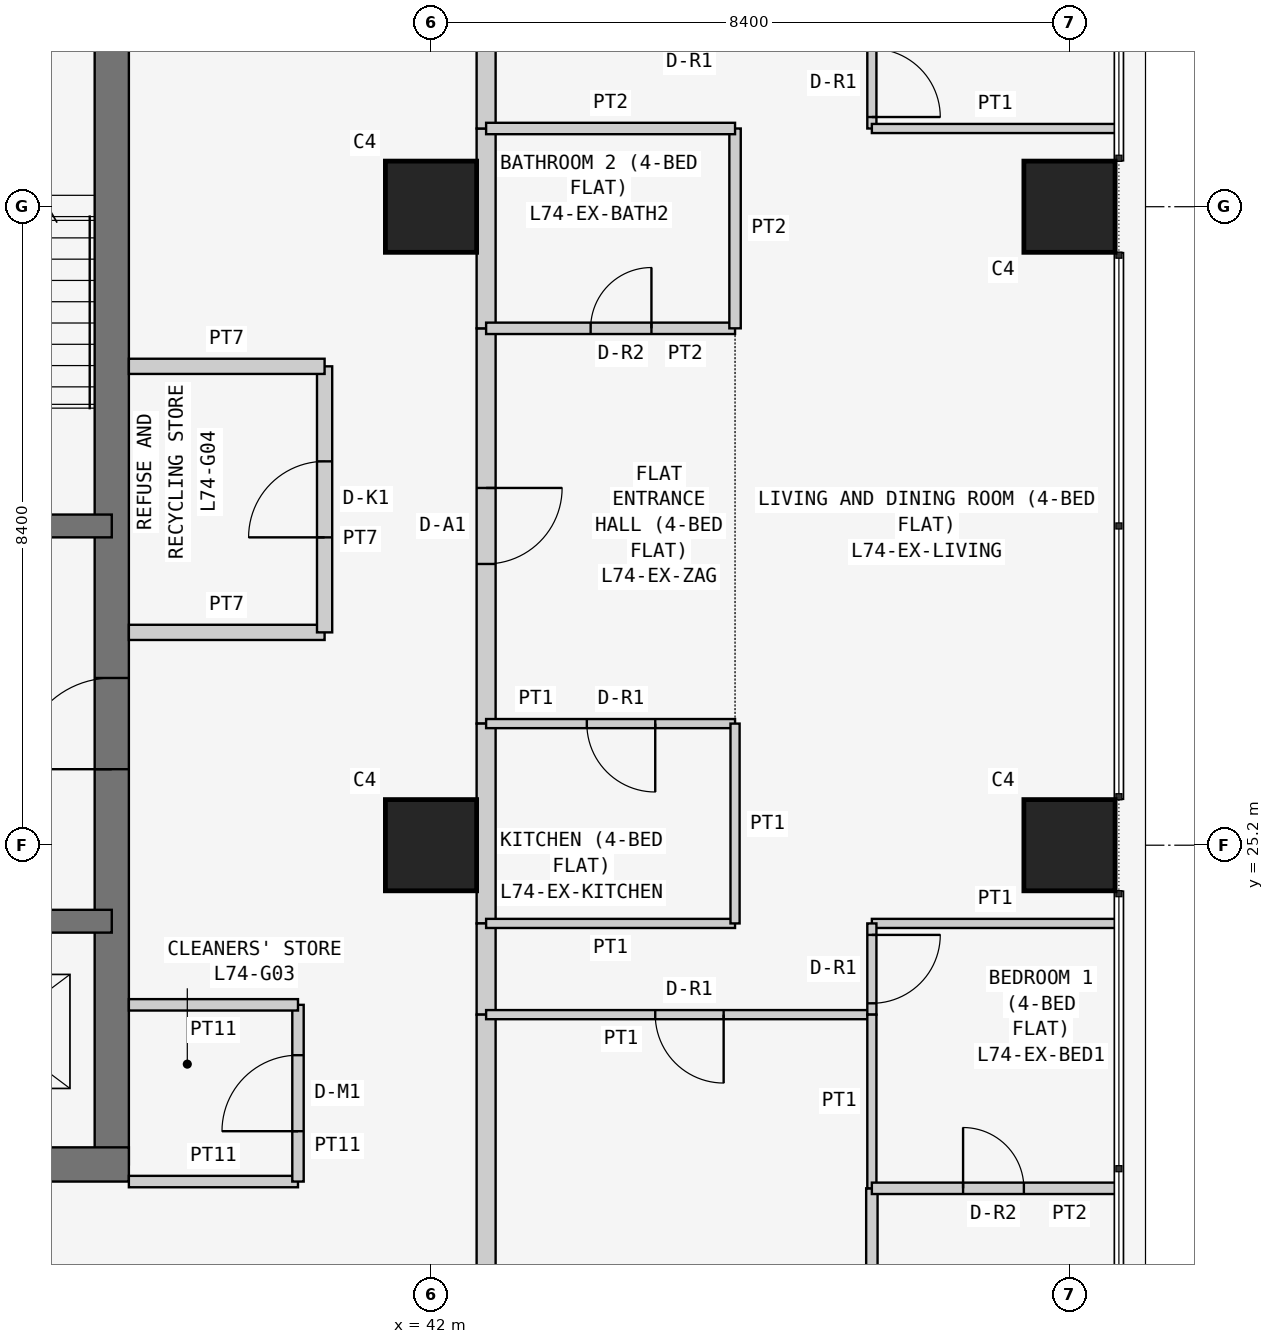
"""IFC4 building model, lengths in metres.
Left out: names, types, materials, properties, quantities, classifications, styles, units other than length and angle.
Written with IfcOpenShell. Run it as: python <this file> out.ifc"""

import sys

from ifc_helpers import new_model, si_unit, direction, frame, frame_2d, origin, origin_2d, place, context, subcontext, project, spatial, rectangle, extrude, element, fill, save


model = new_model("IFC4")
c1 = context("Model", 3, precision=1e-05, world=origin(), true_north=direction((0.0, 1.0)))
c2 = subcontext(c1, "Body", "Model", "MODEL_VIEW")
j1 = project(units=[si_unit("LENGTHUNIT", "METRE"), si_unit("PLANEANGLEUNIT", "RADIAN")], contexts=[c1])
p1 = place(None, origin())
s1 = spatial("IfcSite", under=j1, at=p1, CompositionType="ELEMENT")
p2 = place(p1, origin())
s2 = spatial("IfcBuilding", under=s1, at=p2, CompositionType="ELEMENT")
p3 = place(p2, frame((0.0, 0.0, 282.9)))
s3 = spatial("IfcBuildingStorey", under=s2, at=p3, CompositionType="ELEMENT", Elevation=282.9)
for number, where, z_axis, x_axis in (
    (1, (42.0, 25.2, 0.0), (0.0, 0.0, 1.0), (1.0, 0.0, 0.0)),
    (2, (42.0, 33.6, 0.0), (0.0, 0.0, 1.0), (1.0, 0.0, 0.0)),
    (3, (50.4, 25.2, 0.0), (0.0, 0.0, 1.0), (1.0, 0.0, 0.0)),
    (4, (50.4, 33.6, 0.0), (0.0, 0.0, 1.0), (1.0, 0.0, 0.0)),
):
    element("IfcColumn", number, at=place(p3, frame(where, z_axis=z_axis, x_axis=x_axis)), inside=s3, PredefinedType="COLUMN", context=c2, shape_type="SweptSolid", body=[
        extrude(rectangle(XDim=1.2, YDim=1.2, at=origin_2d()), origin(), (0.0, 0.0, 1.0), 3.6),
    ])
p4 = place(p3, frame((21.0, 21.0, 0.0), z_axis=(0.0, 0.0, 1.0), x_axis=(1.0, 0.0, 0.0)))
e5 = element("IfcWall", 5, at=p4, inside=s3, PredefinedType="SHEAR", context=c2, shape_type="SweptSolid", body=[
    extrude(rectangle(XDim=17.025, YDim=0.45, at=frame_2d((8.512, 0.0))), origin(), (0.0, 0.0, 1.0), 3.6),
])
p5 = place(p3, frame((37.8, 21.0, 0.0), z_axis=(0.0, 0.0, 1.0), x_axis=(0.0, 1.0, 0.0)))
e6 = element("IfcWall", 6, at=p5, inside=s3, PredefinedType="SHEAR", context=c2, shape_type="SweptSolid", body=[
    extrude(rectangle(XDim=17.025, YDim=0.45, at=frame_2d((8.512, 0.0))), origin(), (0.0, 0.0, 1.0), 3.6),
])
p6 = place(p5, frame((5.2, 0.0, 0.0)))
e7 = element("IfcOpeningElement", 7, at=p6, cuts=e6, PredefinedType="OPENING", context=c2, shape_type="SweptSolid", body=[
    extrude(rectangle(XDim=1.2, YDim=2.1, at=frame_2d((0.6, 1.05))), frame((0.0, 0.235, 0.0), z_axis=(0.0, -1.0, 0.0), x_axis=(1.0, 0.0, 0.0)), (0.0, 0.0, 1.0), 0.47),
])
p7 = place(p3, frame((26.6, 24.2, 0.0), z_axis=(0.0, 0.0, 1.0), x_axis=(1.0, 0.0, 0.0)))
e8 = element("IfcWall", 8, at=p7, inside=s3, PredefinedType="SHEAR", context=c2, shape_type="SweptSolid", body=[
    extrude(rectangle(XDim=11.2, YDim=0.3, at=frame_2d((5.6, 0.0))), origin(), (0.0, 0.0, 1.0), 3.6),
])
p8 = place(p7, frame((0.913, 0.0, 0.0)))
e9 = element("IfcOpeningElement", 9, at=p8, cuts=e8, PredefinedType="OPENING", context=c2, shape_type="SweptSolid", body=[
    extrude(rectangle(XDim=1.0, YDim=2.1, at=frame_2d((0.5, 1.05))), frame((0.0, 0.16, 0.0), z_axis=(0.0, -1.0, 0.0), x_axis=(1.0, 0.0, 0.0)), (0.0, 0.0, 1.0), 0.32),
])
p9 = place(p7, frame((3.7, 0.0, 0.0)))
e10 = element("IfcOpeningElement", 10, at=p9, cuts=e8, PredefinedType="OPENING", context=c2, shape_type="SweptSolid", body=[
    extrude(rectangle(XDim=1.0, YDim=2.1, at=frame_2d((0.5, 1.05))), frame((0.0, 0.16, 0.0), z_axis=(0.0, -1.0, 0.0), x_axis=(1.0, 0.0, 0.0)), (0.0, 0.0, 1.0), 0.32),
])
p10 = place(p7, frame((6.5, 0.0, 0.0)))
e11 = element("IfcOpeningElement", 11, at=p10, cuts=e8, PredefinedType="OPENING", context=c2, shape_type="SweptSolid", body=[
    extrude(rectangle(XDim=1.0, YDim=2.1, at=frame_2d((0.5, 1.05))), frame((0.0, 0.16, 0.0), z_axis=(0.0, -1.0, 0.0), x_axis=(1.0, 0.0, 0.0)), (0.0, 0.0, 1.0), 0.32),
])
p11 = place(p7, frame((9.1, 0.0, 0.0)))
e12 = element("IfcOpeningElement", 12, at=p11, cuts=e8, PredefinedType="OPENING", context=c2, shape_type="SweptSolid", body=[
    extrude(rectangle(XDim=1.1, YDim=2.1, at=frame_2d((0.55, 1.05))), frame((0.0, 0.16, 0.0), z_axis=(0.0, -1.0, 0.0), x_axis=(1.0, 0.0, 0.0)), (0.0, 0.0, 1.0), 0.32),
])
p12 = place(p3, frame((32.2, 29.4, 0.0), z_axis=(0.0, 0.0, 1.0), x_axis=(1.0, 0.0, 0.0)))
e13 = element("IfcWall", 13, at=p12, inside=s3, PredefinedType="SHEAR", context=c2, shape_type="SweptSolid", body=[
    extrude(rectangle(XDim=5.6, YDim=0.3, at=frame_2d((2.8, 0.0))), origin(), (0.0, 0.0, 1.0), 3.6),
])
p13 = place(p12, frame((2.0, 0.0, 0.0)))
e14 = element("IfcOpeningElement", 14, at=p13, cuts=e13, PredefinedType="OPENING", context=c2, shape_type="SweptSolid", body=[
    extrude(rectangle(XDim=1.2, YDim=2.1, at=frame_2d((0.6, 1.05))), frame((0.0, 0.16, 0.0), z_axis=(0.0, -1.0, 0.0), x_axis=(1.0, 0.0, 0.0)), (0.0, 0.0, 1.0), 0.32),
])
p14 = place(p3, frame((38.025, 20.775, 0.0), z_axis=(0.0, 0.0, 1.0), x_axis=(1.0, 0.0, 0.0)))
e15 = element("IfcWall", 15, at=p14, inside=s3, PredefinedType="PARTITIONING", context=c2, shape_type="SweptSolid", body=[
    extrude(rectangle(XDim=2.225, YDim=0.15, at=frame_2d((1.113, 0.0))), origin(), (0.0, 0.0, 1.0), 3.45),
])
p15 = place(p3, frame((40.25, 20.775, 0.0), z_axis=(0.0, 0.0, 1.0), x_axis=(0.0, 1.0, 0.0)))
e16 = element("IfcWall", 16, at=p15, inside=s3, PredefinedType="PARTITIONING", context=c2, shape_type="SweptSolid", body=[
    extrude(rectangle(XDim=2.325, YDim=0.15, at=frame_2d((1.163, 0.0))), origin(), (0.0, 0.0, 1.0), 3.45),
])
p16 = place(p15, frame((0.663, 0.0, 0.0)))
e17 = element("IfcOpeningElement", 17, at=p16, cuts=e16, PredefinedType="OPENING", context=c2, shape_type="SweptSolid", body=[
    extrude(rectangle(XDim=1.0, YDim=2.1, at=frame_2d((0.5, 1.05))), frame((0.0, 0.085, 0.0), z_axis=(0.0, -1.0, 0.0), x_axis=(1.0, 0.0, 0.0)), (0.0, 0.0, 1.0), 0.17),
])
p17 = place(p3, frame((40.25, 23.1, 0.0), z_axis=(0.0, 0.0, 1.0), x_axis=(-1.0, 0.0, 0.0)))
e18 = element("IfcWall", 18, at=p17, inside=s3, PredefinedType="PARTITIONING", context=c2, shape_type="SweptSolid", body=[
    extrude(rectangle(XDim=2.225, YDim=0.15, at=frame_2d((1.113, 0.0))), origin(), (0.0, 0.0, 1.0), 3.45),
])
p18 = place(p3, frame((38.025, 28.0, 0.0), z_axis=(0.0, 0.0, 1.0), x_axis=(1.0, 0.0, 0.0)))
e19 = element("IfcWall", 19, at=p18, inside=s3, PredefinedType="PARTITIONING", context=c2, shape_type="SweptSolid", body=[
    extrude(rectangle(XDim=2.575, YDim=0.2, at=frame_2d((1.288, 0.0))), origin(), (0.0, 0.0, 1.0), 3.45),
])
p19 = place(p3, frame((40.6, 28.0, 0.0), z_axis=(0.0, 0.0, 1.0), x_axis=(0.0, 1.0, 0.0)))
e20 = element("IfcWall", 20, at=p19, inside=s3, PredefinedType="PARTITIONING", context=c2, shape_type="SweptSolid", body=[
    extrude(rectangle(XDim=3.5, YDim=0.2, at=frame_2d((1.75, 0.0))), origin(), (0.0, 0.0, 1.0), 3.45),
])
p20 = place(p19, frame((1.25, 0.0, 0.0)))
e21 = element("IfcOpeningElement", 21, at=p20, cuts=e20, PredefinedType="OPENING", context=c2, shape_type="SweptSolid", body=[
    extrude(rectangle(XDim=1.0, YDim=2.1, at=frame_2d((0.5, 1.05))), frame((0.0, 0.11, 0.0), z_axis=(0.0, -1.0, 0.0), x_axis=(1.0, 0.0, 0.0)), (0.0, 0.0, 1.0), 0.22),
])
p21 = place(p3, frame((40.6, 31.5, 0.0), z_axis=(0.0, 0.0, 1.0), x_axis=(-1.0, 0.0, 0.0)))
e22 = element("IfcWall", 22, at=p21, inside=s3, PredefinedType="PARTITIONING", context=c2, shape_type="SweptSolid", body=[
    extrude(rectangle(XDim=2.575, YDim=0.2, at=frame_2d((1.288, 0.0))), origin(), (0.0, 0.0, 1.0), 3.45),
])
p22 = place(p3, frame((42.725, 32.0, 0.0), z_axis=(0.0, 0.0, 1.0), x_axis=(0.0, -1.0, 0.0)))
e23 = element("IfcWall", 23, at=p22, inside=s3, PredefinedType="PARTITIONING", context=c2, shape_type="SweptSolid", body=[
    extrude(rectangle(XDim=5.2, YDim=0.25, at=frame_2d((2.6, 0.0))), origin(), (0.0, 0.0, 1.0), 3.45),
])
p23 = place(p22, frame((2.1, 0.0, 0.0)))
e24 = element("IfcOpeningElement", 24, at=p23, cuts=e23, PredefinedType="OPENING", context=c2, shape_type="SweptSolid", body=[
    extrude(rectangle(XDim=1.0, YDim=2.1, at=frame_2d((0.5, 1.05))), frame((0.0, 0.135, 0.0), z_axis=(0.0, -1.0, 0.0), x_axis=(1.0, 0.0, 0.0)), (0.0, 0.0, 1.0), 0.27),
])
p24 = place(p3, frame((42.725, 34.629, 0.0), z_axis=(0.0, 0.0, 1.0), x_axis=(0.0, -1.0, 0.0)))
e25 = element("IfcWall", 25, at=p24, inside=s3, PredefinedType="PARTITIONING", context=c2, shape_type="SweptSolid", body=[
    extrude(rectangle(XDim=2.629, YDim=0.25, at=frame_2d((1.314, 0.0))), origin(), (0.0, 0.0, 1.0), 3.45),
])
p25 = place(p3, frame((42.725, 26.8, 0.0), z_axis=(0.0, 0.0, 1.0), x_axis=(0.0, -1.0, 0.0)))
e26 = element("IfcWall", 26, at=p25, inside=s3, PredefinedType="PARTITIONING", context=c2, shape_type="SweptSolid", body=[
    extrude(rectangle(XDim=2.629, YDim=0.25, at=frame_2d((1.314, 0.0))), origin(), (0.0, 0.0, 1.0), 3.45),
])
p26 = place(p3, frame((42.725, 24.171, 0.0), z_axis=(0.0, 0.0, 1.0), x_axis=(0.0, -1.0, 0.0)))
e27 = element("IfcWall", 27, at=p26, inside=s3, PredefinedType="PARTITIONING", context=c2, shape_type="SweptSolid", body=[
    extrude(rectangle(XDim=1.2, YDim=0.25, at=frame_2d((0.6, 0.0))), origin(), (0.0, 0.0, 1.0), 3.45),
])
p27 = place(p3, frame((42.725, 35.829, 0.0), z_axis=(0.0, 0.0, 1.0), x_axis=(0.0, -1.0, 0.0)))
e28 = element("IfcWall", 28, at=p27, inside=s3, PredefinedType="PARTITIONING", context=c2, shape_type="SweptSolid", body=[
    extrude(rectangle(XDim=1.2, YDim=0.25, at=frame_2d((0.6, 0.0))), origin(), (0.0, 0.0, 1.0), 3.45),
])
p28 = place(p3, frame((42.725, 22.971, 0.0), z_axis=(0.0, 0.0, 1.0), x_axis=(0.0, -1.0, 0.0)))
e29 = element("IfcWall", 29, at=p28, inside=s3, PredefinedType="PARTITIONING", context=c2, shape_type="SweptSolid", body=[
    extrude(rectangle(XDim=6.871, YDim=0.25, at=frame_2d((3.436, 0.0))), origin(), (0.0, 0.0, 1.0), 3.45),
])
p29 = place(p3, frame((46.0, 32.0, 0.0), z_axis=(0.0, 0.0, 1.0), x_axis=(-1.0, 0.0, 0.0)))
e30 = element("IfcWall", 30, at=p29, inside=s3, PredefinedType="PARTITIONING", context=c2, shape_type="SweptSolid", body=[
    extrude(rectangle(XDim=3.275, YDim=0.15, at=frame_2d((1.637, 0.0))), origin(), (0.0, 0.0, 1.0), 3.45),
])
p30 = place(p29, frame((1.1, 0.0, 0.0)))
e31 = element("IfcOpeningElement", 31, at=p30, cuts=e30, PredefinedType="OPENING", context=c2, shape_type="SweptSolid", body=[
    extrude(rectangle(XDim=0.8, YDim=2.1, at=frame_2d((0.4, 1.05))), frame((0.0, 0.085, 0.0), z_axis=(0.0, -1.0, 0.0), x_axis=(1.0, 0.0, 0.0)), (0.0, 0.0, 1.0), 0.17),
])
p31 = place(p3, frame((42.725, 26.8, 0.0), z_axis=(0.0, 0.0, 1.0), x_axis=(1.0, 0.0, 0.0)))
e32 = element("IfcWall", 32, at=p31, inside=s3, PredefinedType="PARTITIONING", context=c2, shape_type="SweptSolid", body=[
    extrude(rectangle(XDim=3.275, YDim=0.12, at=frame_2d((1.637, 0.0))), origin(), (0.0, 0.0, 1.0), 3.45),
])
p32 = place(p31, frame((1.325, 0.0, 0.0)))
e33 = element("IfcOpeningElement", 33, at=p32, cuts=e32, PredefinedType="OPENING", context=c2, shape_type="SweptSolid", body=[
    extrude(rectangle(XDim=0.9, YDim=2.1, at=frame_2d((0.45, 1.05))), frame((0.0, 0.07, 0.0), z_axis=(0.0, -1.0, 0.0), x_axis=(1.0, 0.0, 0.0)), (0.0, 0.0, 1.0), 0.14),
])
p33 = place(p3, frame((46.0, 32.0, 0.0), z_axis=(0.0, 0.0, 1.0), x_axis=(0.0, 1.0, 0.0)))
e34 = element("IfcWall", 34, at=p33, inside=s3, PredefinedType="PARTITIONING", context=c2, shape_type="SweptSolid", body=[
    extrude(rectangle(XDim=2.629, YDim=0.15, at=frame_2d((1.314, 0.0))), origin(), (0.0, 0.0, 1.0), 3.45),
])
p34 = place(p3, frame((46.0, 34.629, 0.0), z_axis=(0.0, 0.0, 1.0), x_axis=(-1.0, 0.0, 0.0)))
e35 = element("IfcWall", 35, at=p34, inside=s3, PredefinedType="PARTITIONING", context=c2, shape_type="SweptSolid", body=[
    extrude(rectangle(XDim=3.275, YDim=0.15, at=frame_2d((1.637, 0.0))), origin(), (0.0, 0.0, 1.0), 3.45),
])
p35 = place(p3, frame((42.725, 24.171, 0.0), z_axis=(0.0, 0.0, 1.0), x_axis=(1.0, 0.0, 0.0)))
e36 = element("IfcWall", 36, at=p35, inside=s3, PredefinedType="PARTITIONING", context=c2, shape_type="SweptSolid", body=[
    extrude(rectangle(XDim=3.275, YDim=0.12, at=frame_2d((1.637, 0.0))), origin(), (0.0, 0.0, 1.0), 3.45),
])
p36 = place(p3, frame((46.0, 24.171, 0.0), z_axis=(0.0, 0.0, 1.0), x_axis=(0.0, 1.0, 0.0)))
e37 = element("IfcWall", 37, at=p36, inside=s3, PredefinedType="PARTITIONING", context=c2, shape_type="SweptSolid", body=[
    extrude(rectangle(XDim=2.629, YDim=0.12, at=frame_2d((1.314, 0.0))), origin(), (0.0, 0.0, 1.0), 3.45),
])
p37 = place(p3, frame((47.8, 35.829, 0.0), z_axis=(0.0, 0.0, 1.0), x_axis=(0.0, -1.0, 0.0)))
e38 = element("IfcWall", 38, at=p37, inside=s3, PredefinedType="PARTITIONING", context=c2, shape_type="SweptSolid", body=[
    extrude(rectangle(XDim=1.2, YDim=0.12, at=frame_2d((0.6, 0.0))), origin(), (0.0, 0.0, 1.0), 3.45),
])
p38 = place(p37, frame((0.149, 0.0, 0.0)))
e39 = element("IfcOpeningElement", 39, at=p38, cuts=e38, PredefinedType="OPENING", context=c2, shape_type="SweptSolid", body=[
    extrude(rectangle(XDim=0.9, YDim=2.1, at=frame_2d((0.45, 1.05))), frame((0.0, 0.07, 0.0), z_axis=(0.0, -1.0, 0.0), x_axis=(1.0, 0.0, 0.0)), (0.0, 0.0, 1.0), 0.14),
])
p39 = place(p3, frame((47.8, 34.629, 0.0), z_axis=(0.0, 0.0, 1.0), x_axis=(1.0, 0.0, 0.0)))
e40 = element("IfcWall", 40, at=p39, inside=s3, PredefinedType="PARTITIONING", context=c2, shape_type="SweptSolid", body=[
    extrude(rectangle(XDim=3.25, YDim=0.12, at=frame_2d((1.625, 0.0))), origin(), (0.0, 0.0, 1.0), 3.45),
])
p40 = place(p3, frame((47.8, 22.971, 0.0), z_axis=(0.0, 0.0, 1.0), x_axis=(-1.0, 0.0, 0.0)))
e41 = element("IfcWall", 41, at=p40, inside=s3, PredefinedType="PARTITIONING", context=c2, shape_type="SweptSolid", body=[
    extrude(rectangle(XDim=5.075, YDim=0.12, at=frame_2d((2.538, 0.0))), origin(), (0.0, 0.0, 1.0), 3.45),
])
p41 = place(p40, frame((1.95, 0.0, 0.0)))
e42 = element("IfcOpeningElement", 42, at=p41, cuts=e41, PredefinedType="OPENING", context=c2, shape_type="SweptSolid", body=[
    extrude(rectangle(XDim=0.9, YDim=2.1, at=frame_2d((0.45, 1.05))), frame((0.0, 0.07, 0.0), z_axis=(0.0, -1.0, 0.0), x_axis=(1.0, 0.0, 0.0)), (0.0, 0.0, 1.0), 0.14),
])
p42 = place(p3, frame((51.05, 24.171, 0.0), z_axis=(0.0, 0.0, 1.0), x_axis=(-1.0, 0.0, 0.0)))
e43 = element("IfcWall", 43, at=p42, inside=s3, PredefinedType="PARTITIONING", context=c2, shape_type="SweptSolid", body=[
    extrude(rectangle(XDim=3.25, YDim=0.12, at=frame_2d((1.625, 0.0))), origin(), (0.0, 0.0, 1.0), 3.45),
])
p43 = place(p3, frame((47.8, 24.171, 0.0), z_axis=(0.0, 0.0, 1.0), x_axis=(0.0, -1.0, 0.0)))
e44 = element("IfcWall", 44, at=p43, inside=s3, PredefinedType="PARTITIONING", context=c2, shape_type="SweptSolid", body=[
    extrude(rectangle(XDim=1.2, YDim=0.12, at=frame_2d((0.6, 0.0))), origin(), (0.0, 0.0, 1.0), 3.45),
])
p44 = place(p43, frame((0.151, 0.0, 0.0)))
e45 = element("IfcOpeningElement", 45, at=p44, cuts=e44, PredefinedType="OPENING", context=c2, shape_type="SweptSolid", body=[
    extrude(rectangle(XDim=0.9, YDim=2.1, at=frame_2d((0.45, 1.05))), frame((0.0, 0.07, 0.0), z_axis=(0.0, -1.0, 0.0), x_axis=(1.0, 0.0, 0.0)), (0.0, 0.0, 1.0), 0.14),
])
p45 = place(p3, frame((47.8, 16.1, 0.0), z_axis=(0.0, 0.0, 1.0), x_axis=(0.0, 1.0, 0.0)))
e46 = element("IfcWall", 46, at=p45, inside=s3, PredefinedType="PARTITIONING", context=c2, shape_type="SweptSolid", body=[
    extrude(rectangle(XDim=4.586, YDim=0.15, at=frame_2d((2.293, 0.0))), origin(), (0.0, 0.0, 1.0), 3.45),
])
p46 = place(p3, frame((47.8, 20.686, 0.0), z_axis=(0.0, 0.0, 1.0), x_axis=(0.0, 1.0, 0.0)))
e47 = element("IfcWall", 47, at=p46, inside=s3, PredefinedType="PARTITIONING", context=c2, shape_type="SweptSolid", body=[
    extrude(rectangle(XDim=2.285, YDim=0.12, at=frame_2d((1.143, 0.0))), origin(), (0.0, 0.0, 1.0), 3.45),
])
p47 = place(p3, frame((51.05, 20.686, 0.0), z_axis=(0.0, 0.0, 1.0), x_axis=(-1.0, 0.0, 0.0)))
e48 = element("IfcWall", 48, at=p47, inside=s3, PredefinedType="PARTITIONING", context=c2, shape_type="SweptSolid", body=[
    extrude(rectangle(XDim=3.25, YDim=0.15, at=frame_2d((1.625, 0.0))), origin(), (0.0, 0.0, 1.0), 3.45),
])
p48 = place(p47, frame((1.25, 0.0, 0.0)))
e49 = element("IfcOpeningElement", 49, at=p48, cuts=e48, PredefinedType="OPENING", context=c2, shape_type="SweptSolid", body=[
    extrude(rectangle(XDim=0.8, YDim=2.1, at=frame_2d((0.4, 1.05))), frame((0.0, 0.085, 0.0), z_axis=(0.0, -1.0, 0.0), x_axis=(1.0, 0.0, 0.0)), (0.0, 0.0, 1.0), 0.17),
])
p49 = place(p16, origin())
e50 = element("IfcDoor", 50, at=p49, inside=s3, OperationType="SINGLE_SWING_LEFT", PredefinedType="DOOR", context=c2, shape_type="SweptSolid", body=[
    extrude(rectangle(XDim=1.0, YDim=2.1, at=frame_2d((0.5, 1.05))), frame((0.0, 0.025, 0.0), z_axis=(0.0, -1.0, 0.0), x_axis=(1.0, 0.0, 0.0)), (0.0, 0.0, 1.0), 0.05),
])
fill(e17, e50)
p50 = place(p20, origin())
e51 = element("IfcDoor", 51, at=p50, inside=s3, OperationType="SINGLE_SWING_LEFT", PredefinedType="DOOR", context=c2, shape_type="SweptSolid", body=[
    extrude(rectangle(XDim=1.0, YDim=2.1, at=frame_2d((0.5, 1.05))), frame((0.0, 0.025, 0.0), z_axis=(0.0, -1.0, 0.0), x_axis=(1.0, 0.0, 0.0)), (0.0, 0.0, 1.0), 0.05),
])
fill(e21, e51)
p51 = place(p23, origin())
e52 = element("IfcDoor", 52, at=p51, inside=s3, OperationType="SINGLE_SWING_LEFT", PredefinedType="DOOR", context=c2, shape_type="SweptSolid", body=[
    extrude(rectangle(XDim=1.0, YDim=2.1, at=frame_2d((0.5, 1.05))), frame((0.0, 0.025, 0.0), z_axis=(0.0, -1.0, 0.0), x_axis=(1.0, 0.0, 0.0)), (0.0, 0.0, 1.0), 0.05),
])
fill(e24, e52)
p52 = place(p30, frame((0.8, 0.0, 0.0), z_axis=(0.0, 0.0, 1.0), x_axis=(-1.0, 0.0, 0.0)))
e53 = element("IfcDoor", 53, at=p52, inside=s3, OperationType="SINGLE_SWING_RIGHT", PredefinedType="DOOR", context=c2, shape_type="SweptSolid", body=[
    extrude(rectangle(XDim=0.8, YDim=2.1, at=frame_2d((0.4, 1.05))), frame((0.0, 0.025, 0.0), z_axis=(0.0, -1.0, 0.0), x_axis=(1.0, 0.0, 0.0)), (0.0, 0.0, 1.0), 0.05),
])
fill(e31, e53)
p53 = place(p32, frame((0.9, 0.0, 0.0), z_axis=(0.0, 0.0, 1.0), x_axis=(-1.0, 0.0, 0.0)))
e54 = element("IfcDoor", 54, at=p53, inside=s3, OperationType="SINGLE_SWING_LEFT", PredefinedType="DOOR", context=c2, shape_type="SweptSolid", body=[
    extrude(rectangle(XDim=0.9, YDim=2.1, at=frame_2d((0.45, 1.05))), frame((0.0, 0.025, 0.0), z_axis=(0.0, -1.0, 0.0), x_axis=(1.0, 0.0, 0.0)), (0.0, 0.0, 1.0), 0.05),
])
fill(e33, e54)
p54 = place(p38, origin())
e55 = element("IfcDoor", 55, at=p54, inside=s3, OperationType="SINGLE_SWING_RIGHT", PredefinedType="DOOR", context=c2, shape_type="SweptSolid", body=[
    extrude(rectangle(XDim=0.9, YDim=2.1, at=frame_2d((0.45, 1.05))), frame((0.0, 0.025, 0.0), z_axis=(0.0, -1.0, 0.0), x_axis=(1.0, 0.0, 0.0)), (0.0, 0.0, 1.0), 0.05),
])
fill(e39, e55)
p55 = place(p41, origin())
e56 = element("IfcDoor", 56, at=p55, inside=s3, OperationType="SINGLE_SWING_LEFT", PredefinedType="DOOR", context=c2, shape_type="SweptSolid", body=[
    extrude(rectangle(XDim=0.9, YDim=2.1, at=frame_2d((0.45, 1.05))), frame((0.0, 0.025, 0.0), z_axis=(0.0, -1.0, 0.0), x_axis=(1.0, 0.0, 0.0)), (0.0, 0.0, 1.0), 0.05),
])
fill(e42, e56)
p56 = place(p44, origin())
e57 = element("IfcDoor", 57, at=p56, inside=s3, OperationType="SINGLE_SWING_LEFT", PredefinedType="DOOR", context=c2, shape_type="SweptSolid", body=[
    extrude(rectangle(XDim=0.9, YDim=2.1, at=frame_2d((0.45, 1.05))), frame((0.0, 0.025, 0.0), z_axis=(0.0, -1.0, 0.0), x_axis=(1.0, 0.0, 0.0)), (0.0, 0.0, 1.0), 0.05),
])
fill(e45, e57)
p57 = place(p48, frame((0.8, 0.0, 0.0), z_axis=(0.0, 0.0, 1.0), x_axis=(-1.0, 0.0, 0.0)))
e58 = element("IfcDoor", 58, at=p57, inside=s3, OperationType="SINGLE_SWING_LEFT", PredefinedType="DOOR", context=c2, shape_type="SweptSolid", body=[
    extrude(rectangle(XDim=0.8, YDim=2.1, at=frame_2d((0.4, 1.05))), frame((0.0, 0.025, 0.0), z_axis=(0.0, -1.0, 0.0), x_axis=(1.0, 0.0, 0.0)), (0.0, 0.0, 1.0), 0.05),
])
fill(e49, e58)
p58 = place(p6, origin())
e59 = element("IfcDoor", 59, at=p58, inside=s3, OperationType="SINGLE_SWING_LEFT", PredefinedType="DOOR", context=c2, shape_type="SweptSolid", body=[
    extrude(rectangle(XDim=1.2, YDim=2.1, at=frame_2d((0.6, 1.05))), frame((0.0, 0.025, 0.0), z_axis=(0.0, -1.0, 0.0), x_axis=(1.0, 0.0, 0.0)), (0.0, 0.0, 1.0), 0.05),
])
fill(e7, e59)
save(model, sys.argv[1])
